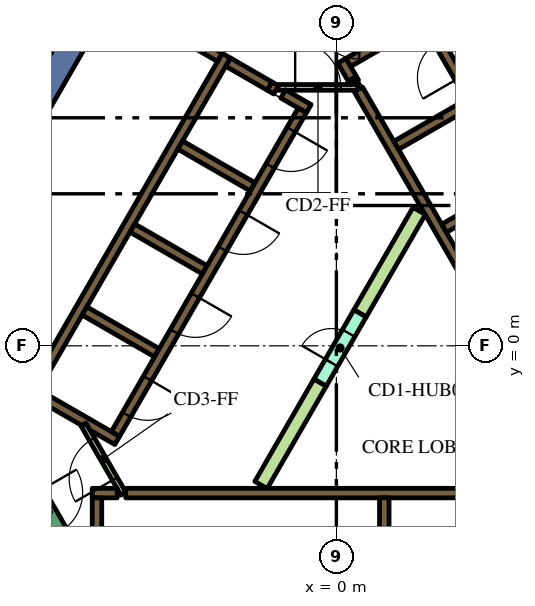
"""IFC4 building model, lengths in metres.
Left out: names, types, materials, properties, quantities, classifications, styles, units other than length and angle.
Written with IfcOpenShell. Run it as: python <this file> out.ifc"""

import sys

from ifc_helpers import new_model, si_unit, direction, frame, frame_2d, origin, place, context, subcontext, project, spatial, polyline, rectangle, outline, extrude, element, fill, save


model = new_model("IFC4")
c1 = context("Model", 3, precision=1e-05, world=origin(), true_north=direction((0.0, 1.0)))
c2 = subcontext(c1, "Body", "Model", "MODEL_VIEW")
j1 = project(units=[si_unit("LENGTHUNIT", "METRE"), si_unit("PLANEANGLEUNIT", "RADIAN")], contexts=[c1])
p1 = place(None, origin())
s1 = spatial("IfcSite", under=j1, at=p1, CompositionType="ELEMENT")
p2 = place(p1, origin())
s2 = spatial("IfcBuilding", under=s1, at=p2, CompositionType="ELEMENT")
p3 = place(p2, frame((0.0, 0.0, 261.6)))
s3 = spatial("IfcBuildingStorey", under=s2, at=p3, CompositionType="ELEMENT", Elevation=261.6)
p4 = place(p3, frame((-12.625, -1.867, 0.0), z_axis=(0.0, 0.0, 1.0), x_axis=(0.499996974394, 0.866027150612, 0.0)))
e1 = element("IfcWall", 1, at=p4, inside=s3, PredefinedType="SOLIDWALL", context=c2, shape_type="SweptSolid", body=[
    extrude(rectangle(XDim=15.858, YDim=0.7, at=frame_2d((7.929, 0.0))), origin(), (0.0, 0.0, 1.0), 5.4),
])
p5 = place(p3, frame((-5.545, -3.875, 0.0), z_axis=(0.0, 0.0, 1.0), x_axis=(1.0, 0.0, 0.0)))
e2 = element("IfcWall", 2, at=p5, inside=s3, PredefinedType="SOLIDWALL", context=c2, shape_type="SweptSolid", body=[
    extrude(rectangle(XDim=11.97, YDim=0.25, at=frame_2d((5.985, 0.0))), origin(), (0.0, 0.0, 1.0), 5.4),
])
p6 = place(p3, frame((-6.425, -3.875, 0.0), z_axis=(0.0, 0.0, 1.0), x_axis=(1.0, 0.0, 0.0)))
e3 = element("IfcWall", 3, at=p6, inside=s3, PredefinedType="SOLIDWALL", context=c2, shape_type="SweptSolid", body=[
    extrude(rectangle(XDim=0.658, YDim=0.25, at=frame_2d((0.329, 0.0))), origin(), (0.0, 0.0, 1.0), 5.4),
])
p7 = place(p3, frame((1.26, -4.0, 0.0), z_axis=(0.0, 0.0, 1.0), x_axis=(0.0, -1.0, 0.0)))
e4 = element("IfcWall", 4, at=p7, inside=s3, PredefinedType="SOLIDWALL", context=c2, shape_type="SweptSolid", body=[
    extrude(rectangle(XDim=2.2, YDim=0.25, at=frame_2d((1.1, 0.0))), origin(), (0.0, 0.0, 1.0), 5.4),
])
p8 = place(p3, frame((-6.3, -7.125, 0.0), z_axis=(0.0, 0.0, 1.0), x_axis=(0.0, 1.0, 0.0)))
e5 = element("IfcWall", 5, at=p8, inside=s3, PredefinedType="SOLIDWALL", context=c2, shape_type="SweptSolid", body=[
    extrude(rectangle(XDim=3.125, YDim=0.25, at=frame_2d((1.562, 0.0))), origin(), (0.0, 0.0, 1.0), 5.4),
])
p9 = place(p3, frame((0.473, 6.93, 0.0), z_axis=(0.0, 0.0, 1.0), x_axis=(-0.49972245349, 0.866185586049, 0.0)))
e6 = element("IfcWall", 6, at=p9, inside=s3, PredefinedType="SOLIDWALL", context=c2, shape_type="SweptSolid", body=[
    extrude(rectangle(XDim=0.11, YDim=0.25, at=frame_2d((0.055, 0.0))), origin(), (0.0, 0.0, 1.0), 5.4),
])
p10 = place(p3, frame((6.568, -3.627, 0.0), z_axis=(0.0, 0.0, 1.0), x_axis=(-0.499999455981, 0.866025717874, 0.0)))
e7 = element("IfcWall", 7, at=p10, inside=s3, PredefinedType="SOLIDWALL", context=c2, shape_type="SweptSolid", body=[
    extrude(rectangle(XDim=11.978, YDim=0.25, at=frame_2d((5.989, 0.0))), origin(), (0.0, 0.0, 1.0), 5.4),
])
p11 = place(p3, frame((0.417, 7.027, 0.0), z_axis=(0.0, 0.0, 1.0), x_axis=(-0.500210807569, 0.865903659763, 0.0)))
e8 = element("IfcWall", 8, at=p11, inside=s3, PredefinedType="SOLIDWALL", context=c2, shape_type="SweptSolid", body=[
    extrude(rectangle(XDim=0.548, YDim=0.25, at=frame_2d((0.274, 0.0))), origin(), (0.0, 0.0, 1.0), 5.4),
])
p12 = place(p3, frame((3.647, 9.38, 0.0), z_axis=(0.0, 0.0, 1.0), x_axis=(-0.866025015791, -0.500000672024, 0.0)))
e9 = element("IfcWall", 9, at=p12, inside=s3, PredefinedType="SOLIDWALL", context=c2, shape_type="SweptSolid", body=[
    extrude(rectangle(XDim=3.849, YDim=0.25, at=frame_2d((1.924, 0.0))), origin(), (0.0, 0.0, 1.0), 5.4),
])
p13 = place(p3, frame((1.574, 5.274, 0.0), z_axis=(0.0, 0.0, 1.0), x_axis=(0.866028486751, 0.499994660107, 0.0)))
e10 = element("IfcWall", 10, at=p13, inside=s3, PredefinedType="SOLIDWALL", context=c2, shape_type="SweptSolid", body=[
    extrude(rectangle(XDim=2.2, YDim=0.25, at=frame_2d((1.1, 0.0))), origin(), (0.0, 0.0, 1.0), 5.4),
])
p14 = place(p3, frame((2.834, 3.091, 0.0), z_axis=(0.0, 0.0, 1.0), x_axis=(0.866008176907, 0.50002983664, 0.0)))
e11 = element("IfcWall", 11, at=p14, inside=s3, PredefinedType="SOLIDWALL", context=c2, shape_type="SweptSolid", body=[
    extrude(rectangle(XDim=2.2, YDim=0.25, at=frame_2d((1.1, 0.0))), origin(), (0.0, 0.0, 1.0), 5.4),
])
p15 = place(p3, frame((-8.06, -1.311, 0.0), z_axis=(0.0, 0.0, 1.0), x_axis=(0.50000273126, 0.866023826885, 0.0)))
e12 = element("IfcWall", 12, at=p15, inside=s3, PredefinedType="SOLIDWALL", context=c2, shape_type="SweptSolid", body=[
    extrude(rectangle(XDim=10.33, YDim=0.25, at=frame_2d((5.165, 0.0))), origin(), (0.0, 0.0, 1.0), 5.4),
])
p16 = place(p3, frame((-1.758, 6.835, 0.0), z_axis=(0.0, 0.0, 1.0), x_axis=(0.865982457891, -0.500074377092, 0.0)))
e13 = element("IfcWall", 13, at=p16, inside=s3, PredefinedType="SOLIDWALL", context=c2, shape_type="SweptSolid", body=[
    extrude(rectangle(XDim=0.2, YDim=0.25, at=frame_2d((0.1, 0.0))), origin(), (0.0, 0.0, 1.0), 5.4),
])
p17 = place(p3, frame((-1.76, 6.836, 0.0), z_axis=(0.0, 0.0, 1.0), x_axis=(-0.865952863304, 0.500125622755, 0.0)))
e14 = element("IfcWall", 14, at=p17, inside=s3, PredefinedType="SOLIDWALL", context=c2, shape_type="SweptSolid", body=[
    extrude(rectangle(XDim=1.258, YDim=0.25, at=frame_2d((0.629, 0.0))), origin(), (0.0, 0.0, 1.0), 5.4),
])
p18 = place(p3, frame((-0.728, 6.24, 0.0), z_axis=(0.0, 0.0, 1.0), x_axis=(-0.865955664968, 0.500120771724, 0.0)))
e15 = element("IfcWall", 15, at=p18, inside=s3, PredefinedType="SOLIDWALL", context=c2, shape_type="SweptSolid", body=[
    extrude(rectangle(XDim=0.778, YDim=0.25, at=frame_2d((0.389, 0.0))), origin(), (0.0, 0.0, 1.0), 5.4),
])
for number, where, z_axis, x_axis in (
    (16, (-2.204, 4.182, 0.0), (0.0, 0.0, 1.0), (-0.866, 0.5, 0.0)),
    (17, (-5.369, 3.1, 0.0), (0.0, 0.0, 1.0), (0.866, -0.5, 0.0)),
    (18, (-4.724, -0.182, 0.0), (0.0, 0.0, 1.0), (-0.866, 0.5, 0.0)),
):
    element("IfcWall", number, at=place(p3, frame(where, z_axis=z_axis, x_axis=x_axis)), inside=s3, PredefinedType="SOLIDWALL", context=c2, shape_type="SweptSolid", body=[
        extrude(rectangle(XDim=2.2, YDim=0.25, at=frame_2d((1.1, 0.0))), origin(), (0.0, 0.0, 1.0), 5.4),
    ])
p19 = place(p3, origin())
e19 = element("IfcWall", 19, at=p19, inside=s3, PredefinedType="SOLIDWALL", context=c2, shape_type="SweptSolid", body=[
    extrude(outline(polyline([(-5.922, -2.257), (-5.922, -2.257), (-5.705, -2.382), (-5.83, -2.598), (-6.483, -2.221), (-6.591, -2.033), (-6.591, -2.033), (-6.7, -2.096), (-7.952, -1.373), (-7.827, -1.156), (-5.922, -2.257)])), origin(), (0.0, 0.0, 1.0), 5.4),
])
p20 = place(p3, frame((-3.066, 7.59, 0.0), z_axis=(0.0, 0.0, 1.0), x_axis=(-0.866081358704, 0.49990307071, 0.0)))
e20 = element("IfcWall", 20, at=p20, inside=s3, PredefinedType="SOLIDWALL", context=c2, shape_type="SweptSolid", body=[
    extrude(rectangle(XDim=0.858, YDim=0.25, at=frame_2d((0.429, 0.0))), origin(), (0.0, 0.0, 1.0), 5.4),
])
e21 = element("IfcWall", 21, at=p19, inside=s3, PredefinedType="PARTITIONING", context=c2, shape_type="SweptSolid", body=[
    extrude(outline(polyline([(2.017, 3.643), (2.342, 3.456), (0.785, 0.76), (0.46, 0.947), (2.017, 3.643)])), origin(), (0.0, 0.0, 1.0), 4.75),
])
e22 = element("IfcWall", 22, at=p19, inside=s3, PredefinedType="PARTITIONING", context=c2, shape_type="SweptSolid", body=[
    extrude(outline(polyline([(-0.59, -0.872), (-0.265, -1.059), (-1.822, -3.756), (-2.147, -3.568), (-0.59, -0.872)])), origin(), (0.0, 0.0, 1.0), 4.75),
])
p21 = place(p3, frame((8.565, -2.185, 0.0), z_axis=(0.0, 0.0, 1.0), x_axis=(-0.499997954832, 0.866026584559, 0.0)))
e23 = element("IfcWall", 23, at=p21, inside=s3, PredefinedType="SOLIDWALL", context=c2, shape_type="SweptSolid", body=[
    extrude(rectangle(XDim=12.35, YDim=0.25, at=frame_2d((6.175, 0.0))), origin(), (0.0, 0.0, 1.0), 5.4),
])
p22 = place(p21, frame((0.685, 0.0, 0.0)))
e24 = element("IfcOpeningElement", 24, at=p22, cuts=e23, PredefinedType="OPENING", context=c2, shape_type="SweptSolid", body=[
    extrude(rectangle(XDim=0.9, YDim=2.1, at=frame_2d((0.45, 1.05))), frame((0.0, 0.135, 0.0), z_axis=(0.0, -1.0, 0.0), x_axis=(1.0, 0.0, 0.0)), (0.0, 0.0, 1.0), 0.27),
])
p23 = place(p21, frame((3.105, 0.0, 0.0)))
e25 = element("IfcOpeningElement", 25, at=p23, cuts=e23, PredefinedType="OPENING", context=c2, shape_type="SweptSolid", body=[
    extrude(rectangle(XDim=1.1, YDim=2.1, at=frame_2d((0.55, 1.05))), frame((0.0, 0.135, 0.0), z_axis=(0.0, -1.0, 0.0), x_axis=(1.0, 0.0, 0.0)), (0.0, 0.0, 1.0), 0.27),
])
p24 = place(p21, frame((5.625, 0.0, 0.0)))
e26 = element("IfcOpeningElement", 26, at=p24, cuts=e23, PredefinedType="OPENING", context=c2, shape_type="SweptSolid", body=[
    extrude(rectangle(XDim=1.1, YDim=2.1, at=frame_2d((0.55, 1.05))), frame((0.0, 0.135, 0.0), z_axis=(0.0, -1.0, 0.0), x_axis=(1.0, 0.0, 0.0)), (0.0, 0.0, 1.0), 0.27),
])
p25 = place(p21, frame((8.145, 0.0, 0.0)))
e27 = element("IfcOpeningElement", 27, at=p25, cuts=e23, PredefinedType="OPENING", context=c2, shape_type="SweptSolid", body=[
    extrude(rectangle(XDim=1.1, YDim=2.1, at=frame_2d((0.55, 1.05))), frame((0.0, 0.135, 0.0), z_axis=(0.0, -1.0, 0.0), x_axis=(1.0, 0.0, 0.0)), (0.0, 0.0, 1.0), 0.27),
])
p26 = place(p21, frame((10.665, 0.0, 0.0)))
e28 = element("IfcOpeningElement", 28, at=p26, cuts=e23, PredefinedType="OPENING", context=c2, shape_type="SweptSolid", body=[
    extrude(rectangle(XDim=1.1, YDim=2.1, at=frame_2d((0.55, 1.05))), frame((0.0, 0.135, 0.0), z_axis=(0.0, -1.0, 0.0), x_axis=(1.0, 0.0, 0.0)), (0.0, 0.0, 1.0), 0.27),
])
p27 = place(p3, frame((-0.898, 6.194, 0.0), z_axis=(0.0, 0.0, 1.0), x_axis=(-0.499996202215, -0.866027596426, 0.0)))
e29 = element("IfcWall", 29, at=p27, inside=s3, PredefinedType="SOLIDWALL", context=c2, shape_type="SweptSolid", body=[
    extrude(rectangle(XDim=9.83, YDim=0.25, at=frame_2d((4.915, 0.0))), origin(), (0.0, 0.0, 1.0), 5.4),
])
p28 = place(p27, frame((0.585, 0.0, 0.0)))
e30 = element("IfcOpeningElement", 30, at=p28, cuts=e29, PredefinedType="OPENING", context=c2, shape_type="SweptSolid", body=[
    extrude(rectangle(XDim=1.1, YDim=2.1, at=frame_2d((0.55, 1.05))), frame((0.0, 0.135, 0.0), z_axis=(0.0, -1.0, 0.0), x_axis=(1.0, 0.0, 0.0)), (0.0, 0.0, 1.0), 0.27),
])
p29 = place(p27, frame((3.105, 0.0, 0.0)))
e31 = element("IfcOpeningElement", 31, at=p29, cuts=e29, PredefinedType="OPENING", context=c2, shape_type="SweptSolid", body=[
    extrude(rectangle(XDim=1.1, YDim=2.1, at=frame_2d((0.55, 1.05))), frame((0.0, 0.135, 0.0), z_axis=(0.0, -1.0, 0.0), x_axis=(1.0, 0.0, 0.0)), (0.0, 0.0, 1.0), 0.27),
])
p30 = place(p27, frame((5.625, 0.0, 0.0)))
e32 = element("IfcOpeningElement", 32, at=p30, cuts=e29, PredefinedType="OPENING", context=c2, shape_type="SweptSolid", body=[
    extrude(rectangle(XDim=1.1, YDim=2.1, at=frame_2d((0.55, 1.05))), frame((0.0, 0.135, 0.0), z_axis=(0.0, -1.0, 0.0), x_axis=(1.0, 0.0, 0.0)), (0.0, 0.0, 1.0), 0.27),
])
p31 = place(p27, frame((8.145, 0.0, 0.0)))
e33 = element("IfcOpeningElement", 33, at=p31, cuts=e29, PredefinedType="OPENING", context=c2, shape_type="SweptSolid", body=[
    extrude(rectangle(XDim=1.1, YDim=2.1, at=frame_2d((0.55, 1.05))), frame((0.0, 0.135, 0.0), z_axis=(0.0, -1.0, 0.0), x_axis=(1.0, 0.0, 0.0)), (0.0, 0.0, 1.0), 0.27),
])
p32 = place(p3, frame((-8.103, -3.466, 0.0), z_axis=(0.0, 0.0, 1.0), x_axis=(0.500078061341, -0.865980330357, 0.0)))
e34 = element("IfcWall", 34, at=p32, inside=s3, PredefinedType="SOLIDWALL", context=c2, shape_type="SweptSolid", body=[
    extrude(rectangle(XDim=2.1, YDim=0.4, at=frame_2d((1.05, 0.0))), origin(), (0.0, 0.0, 1.0), 5.4),
])
p33 = place(p32, frame((0.45, 0.0, 0.0)))
e35 = element("IfcOpeningElement", 35, at=p33, cuts=e34, PredefinedType="OPENING", context=c2, shape_type="SweptSolid", body=[
    extrude(rectangle(XDim=1.2, YDim=2.1, at=frame_2d((0.6, 1.05))), frame((0.0, 0.21, 0.0), z_axis=(0.0, -1.0, 0.0), x_axis=(1.0, 0.0, 0.0)), (0.0, 0.0, 1.0), 0.42),
])
p34 = place(p3, frame((-0.427, -0.966, 0.0), z_axis=(0.0, 0.0, 1.0), x_axis=(0.49994051562, 0.866059744384, 0.0)))
e36 = element("IfcWall", 36, at=p34, inside=s3, PredefinedType="PARTITIONING", context=c2, shape_type="SweptSolid", body=[
    extrude(rectangle(XDim=2.1, YDim=0.375, at=frame_2d((1.05, 0.0))), origin(), (0.0, 0.0, 1.0), 4.75),
])
p35 = place(p34, frame((0.6, 0.0, 0.0)))
e37 = element("IfcOpeningElement", 37, at=p35, cuts=e36, PredefinedType="OPENING", context=c2, shape_type="SweptSolid", body=[
    extrude(rectangle(XDim=0.9, YDim=2.1, at=frame_2d((0.45, 1.05))), frame((0.0, 0.198, 0.0), z_axis=(0.0, -1.0, 0.0), x_axis=(1.0, 0.0, 0.0)), (0.0, 0.0, 1.0), 0.395),
])
p36 = place(p3, frame((-1.534, 6.8, 0.0), z_axis=(0.0, 0.0, 1.0), x_axis=(1.0, 0.0, 0.0)))
e38 = element("IfcWall", 38, at=p36, inside=s3, PredefinedType="PARTITIONING", context=c2, shape_type="SweptSolid", body=[
    extrude(rectangle(XDim=2.1, YDim=0.15, at=frame_2d((1.05, 0.0))), origin(), (0.0, 0.0, 1.0), 4.75),
])
p37 = place(p36, frame((0.45, 0.0, 0.0)))
e39 = element("IfcOpeningElement", 39, at=p37, cuts=e38, PredefinedType="OPENING", context=c2, shape_type="SweptSolid", body=[
    extrude(rectangle(XDim=1.2, YDim=2.1, at=frame_2d((0.6, 1.05))), frame((0.0, 0.085, 0.0), z_axis=(0.0, -1.0, 0.0), x_axis=(1.0, 0.0, 0.0)), (0.0, 0.0, 1.0), 0.17),
])
p38 = place(p3, frame((-5.606, -3.89, 0.0), z_axis=(0.0, 0.0, 1.0), x_axis=(-0.500027713859, 0.866009402589, 0.0)))
e40 = element("IfcWall", 40, at=p38, inside=s3, PredefinedType="PARTITIONING", context=c2, shape_type="SweptSolid", body=[
    extrude(rectangle(XDim=2.1, YDim=0.15, at=frame_2d((1.05, 0.0))), origin(), (0.0, 0.0, 1.0), 4.75),
])
p39 = place(p38, frame((0.45, 0.0, 0.0)))
e41 = element("IfcOpeningElement", 41, at=p39, cuts=e40, PredefinedType="OPENING", context=c2, shape_type="SweptSolid", body=[
    extrude(rectangle(XDim=1.2, YDim=2.1, at=frame_2d((0.6, 1.05))), frame((0.0, 0.085, 0.0), z_axis=(0.0, -1.0, 0.0), x_axis=(1.0, 0.0, 0.0)), (0.0, 0.0, 1.0), 0.17),
])
p40 = place(p3, frame((10.258, 5.934, 0.0), z_axis=(0.0, 0.0, 1.0), x_axis=(-0.500015389047, 0.866016518732, 0.0)))
e42 = element("IfcWall", 42, at=p40, inside=s3, PredefinedType="PARTITIONING", context=c2, shape_type="SweptSolid", body=[
    extrude(rectangle(XDim=14.164, YDim=0.2, at=frame_2d((7.082, 0.0))), origin(), (0.0, 0.0, 1.0), 4.75),
])
p41 = place(p40, frame((6.482, 0.0, 0.0)))
e43 = element("IfcOpeningElement", 43, at=p41, cuts=e42, PredefinedType="OPENING", context=c2, shape_type="SweptSolid", body=[
    extrude(rectangle(XDim=1.2, YDim=2.1, at=frame_2d((0.6, 1.05))), frame((0.0, 0.11, 0.0), z_axis=(0.0, -1.0, 0.0), x_axis=(1.0, 0.0, 0.0)), (0.0, 0.0, 1.0), 0.22),
])
p42 = place(p3, frame((-3.175, 18.2, 0.0), z_axis=(0.0, 0.0, 1.0), x_axis=(-0.500015389047, -0.866016518732, 0.0)))
e44 = element("IfcWall", 44, at=p42, inside=s3, PredefinedType="PARTITIONING", context=c2, shape_type="SweptSolid", body=[
    extrude(rectangle(XDim=14.164, YDim=0.15, at=frame_2d((7.082, 0.0))), origin(), (0.0, 0.0, 1.0), 4.75),
])
p43 = place(p42, frame((6.632, 0.0, 0.0)))
e45 = element("IfcOpeningElement", 45, at=p43, cuts=e44, PredefinedType="OPENING", context=c2, shape_type="SweptSolid", body=[
    extrude(rectangle(XDim=0.9, YDim=2.1, at=frame_2d((0.45, 1.05))), frame((0.0, 0.085, 0.0), z_axis=(0.0, -1.0, 0.0), x_axis=(1.0, 0.0, 0.0)), (0.0, 0.0, 1.0), 0.17),
])
p44 = place(p26, origin())
e46 = element("IfcDoor", 46, at=p44, inside=s3, OperationType="DOUBLE_DOOR_SLIDING", PredefinedType="DOOR", context=c2, shape_type="SweptSolid", body=[
    extrude(rectangle(XDim=1.1, YDim=2.1, at=frame_2d((0.55, 1.05))), frame((0.0, 0.025, 0.0), z_axis=(0.0, -1.0, 0.0), x_axis=(1.0, 0.0, 0.0)), (0.0, 0.0, 1.0), 0.05),
])
fill(e28, e46)
p45 = place(p28, origin())
e47 = element("IfcDoor", 47, at=p45, inside=s3, OperationType="DOUBLE_DOOR_SLIDING", PredefinedType="DOOR", context=c2, shape_type="SweptSolid", body=[
    extrude(rectangle(XDim=1.1, YDim=2.1, at=frame_2d((0.55, 1.05))), frame((0.0, 0.025, 0.0), z_axis=(0.0, -1.0, 0.0), x_axis=(1.0, 0.0, 0.0)), (0.0, 0.0, 1.0), 0.05),
])
fill(e30, e47)
p46 = place(p29, origin())
e48 = element("IfcDoor", 48, at=p46, inside=s3, OperationType="DOUBLE_DOOR_SLIDING", PredefinedType="DOOR", context=c2, shape_type="SweptSolid", body=[
    extrude(rectangle(XDim=1.1, YDim=2.1, at=frame_2d((0.55, 1.05))), frame((0.0, 0.025, 0.0), z_axis=(0.0, -1.0, 0.0), x_axis=(1.0, 0.0, 0.0)), (0.0, 0.0, 1.0), 0.05),
])
fill(e31, e48)
p47 = place(p30, origin())
e49 = element("IfcDoor", 49, at=p47, inside=s3, OperationType="DOUBLE_DOOR_SLIDING", PredefinedType="DOOR", context=c2, shape_type="SweptSolid", body=[
    extrude(rectangle(XDim=1.1, YDim=2.1, at=frame_2d((0.55, 1.05))), frame((0.0, 0.025, 0.0), z_axis=(0.0, -1.0, 0.0), x_axis=(1.0, 0.0, 0.0)), (0.0, 0.0, 1.0), 0.05),
])
fill(e32, e49)
p48 = place(p31, origin())
e50 = element("IfcDoor", 50, at=p48, inside=s3, OperationType="DOUBLE_DOOR_SLIDING", PredefinedType="DOOR", context=c2, shape_type="SweptSolid", body=[
    extrude(rectangle(XDim=1.1, YDim=2.1, at=frame_2d((0.55, 1.05))), frame((0.0, 0.025, 0.0), z_axis=(0.0, -1.0, 0.0), x_axis=(1.0, 0.0, 0.0)), (0.0, 0.0, 1.0), 0.05),
])
fill(e33, e50)
p49 = place(p33, origin())
e51 = element("IfcDoor", 51, at=p49, inside=s3, OperationType="SINGLE_SWING_LEFT", PredefinedType="DOOR", context=c2, shape_type="SweptSolid", body=[
    extrude(rectangle(XDim=1.2, YDim=2.1, at=frame_2d((0.6, 1.05))), frame((0.0, 0.025, 0.0), z_axis=(0.0, -1.0, 0.0), x_axis=(1.0, 0.0, 0.0)), (0.0, 0.0, 1.0), 0.05),
])
fill(e35, e51)
p50 = place(p35, origin())
e52 = element("IfcDoor", 52, at=p50, inside=s3, OperationType="SINGLE_SWING_LEFT", PredefinedType="DOOR", context=c2, shape_type="SweptSolid", body=[
    extrude(rectangle(XDim=0.9, YDim=2.1, at=frame_2d((0.45, 1.05))), frame((0.0, 0.025, 0.0), z_axis=(0.0, -1.0, 0.0), x_axis=(1.0, 0.0, 0.0)), (0.0, 0.0, 1.0), 0.05),
])
fill(e37, e52)
p51 = place(p37, origin())
e53 = element("IfcDoor", 53, at=p51, inside=s3, OperationType="SINGLE_SWING_LEFT", PredefinedType="DOOR", context=c2, shape_type="SweptSolid", body=[
    extrude(rectangle(XDim=1.2, YDim=2.1, at=frame_2d((0.6, 1.05))), frame((0.0, 0.025, 0.0), z_axis=(0.0, -1.0, 0.0), x_axis=(1.0, 0.0, 0.0)), (0.0, 0.0, 1.0), 0.05),
])
fill(e39, e53)
p52 = place(p39, origin())
e54 = element("IfcDoor", 54, at=p52, inside=s3, OperationType="SINGLE_SWING_LEFT", PredefinedType="DOOR", context=c2, shape_type="SweptSolid", body=[
    extrude(rectangle(XDim=1.2, YDim=2.1, at=frame_2d((0.6, 1.05))), frame((0.0, 0.025, 0.0), z_axis=(0.0, -1.0, 0.0), x_axis=(1.0, 0.0, 0.0)), (0.0, 0.0, 1.0), 0.05),
])
fill(e41, e54)
save(model, sys.argv[1])
